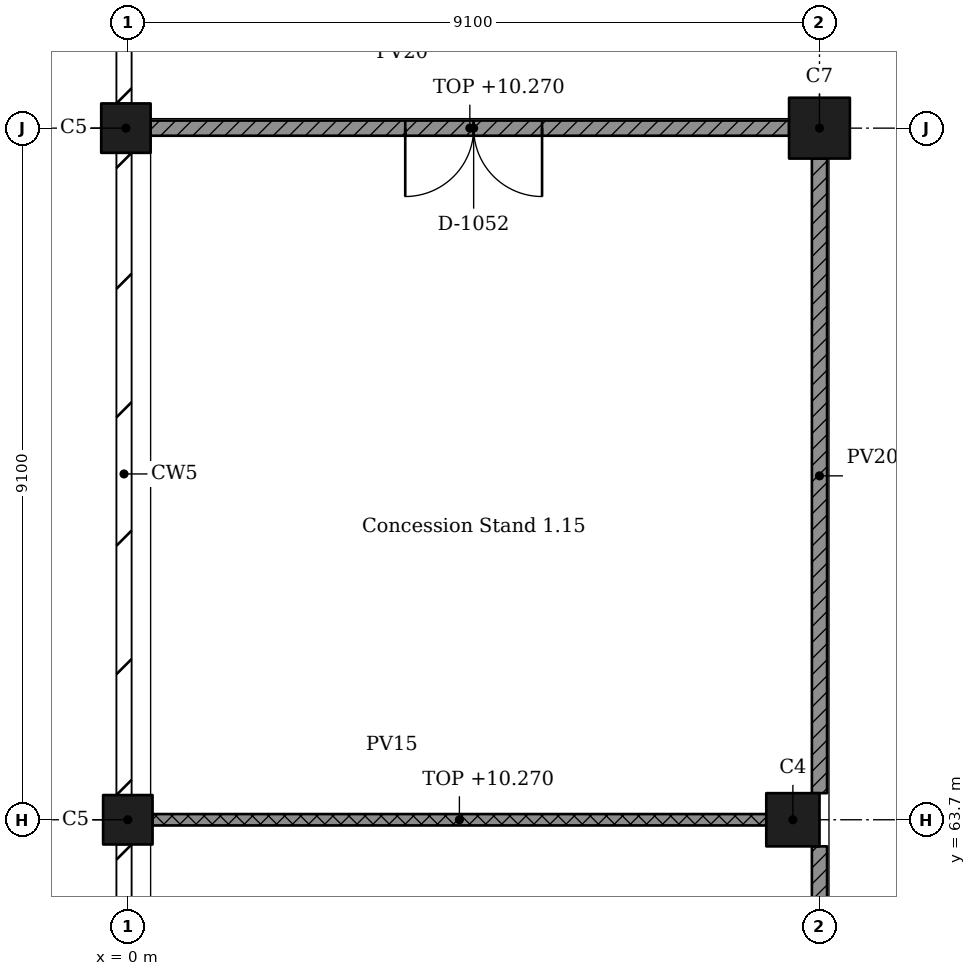
"""IFC4 building model, lengths in metres.
Left out: names, types, materials, properties, quantities, classifications, styles, units other than length and angle.
Written with IfcOpenShell. Run it as: python <this file> out.ifc"""

import sys

from ifc_helpers import new_model, si_unit, direction, frame, frame_2d, origin, origin_2d, place, context, subcontext, project, spatial, rectangle, extrude, element, fill, save


model = new_model("IFC4")
c1 = context("Model", 3, precision=1e-05, world=origin(), true_north=direction((0.0, 1.0)))
c2 = subcontext(c1, "Body", "Model", "MODEL_VIEW")
j1 = project(units=[si_unit("LENGTHUNIT", "METRE"), si_unit("PLANEANGLEUNIT", "RADIAN")], contexts=[c1])
p1 = place(None, origin())
s1 = spatial("IfcSite", under=j1, at=p1, CompositionType="ELEMENT")
p2 = place(p1, origin())
s2 = spatial("IfcBuilding", under=s1, at=p2, CompositionType="ELEMENT")
p3 = place(p2, frame((0.0, 0.0, 6.37)))
s3 = spatial("IfcBuildingStorey", under=s2, at=p3, CompositionType="ELEMENT", Elevation=6.37)
for number, where, z_axis, x_axis in (
    (1, (0.0, 63.7, 0.0), (0.0, 0.0, 1.0), (1.0, 0.0, 0.0)),
    (2, (-0.025, 72.8, 0.0), (0.0, 0.0, 1.0), (1.0, 0.0, 0.0)),
):
    element("IfcColumn", number, at=place(p3, frame(where, z_axis=z_axis, x_axis=x_axis)), inside=s3, PredefinedType="COLUMN", context=c2, shape_type="SweptSolid", body=[
        extrude(rectangle(XDim=0.65, YDim=0.65, at=origin_2d()), origin(), (0.0, 0.0, 1.0), 4.55),
    ])
p4 = place(p3, frame((8.75, 63.7, 0.0), z_axis=(0.0, 0.0, 1.0), x_axis=(1.0, 0.0, 0.0)))
e3 = element("IfcColumn", 3, at=p4, inside=s3, PredefinedType="COLUMN", context=c2, shape_type="SweptSolid", body=[
    extrude(rectangle(XDim=0.7, YDim=0.7, at=origin_2d()), origin(), (0.0, 0.0, 1.0), 4.55),
])
p5 = place(p3, frame((9.1, 72.8, 0.0), z_axis=(0.0, 0.0, 1.0), x_axis=(1.0, 0.0, 0.0)))
e4 = element("IfcColumn", 4, at=p5, inside=s3, PredefinedType="COLUMN", context=c2, shape_type="SweptSolid", body=[
    extrude(rectangle(XDim=0.8, YDim=0.8, at=origin_2d()), origin(), (0.0, 0.0, 1.0), 4.55),
])
p6 = place(p3, frame((0.325, 63.7, 0.0), z_axis=(0.0, 0.0, 1.0), x_axis=(1.0, 0.0, 0.0)))
e5 = element("IfcWall", 5, at=p6, inside=s3, PredefinedType="PARTITIONING", context=c2, shape_type="SweptSolid", body=[
    extrude(rectangle(XDim=8.075, YDim=0.15, at=frame_2d((4.038, 0.0))), origin(), (0.0, 0.0, 1.0), 3.9),
])
p7 = place(p3, frame((8.7, 72.8, 0.0), z_axis=(0.0, 0.0, 1.0), x_axis=(-1.0, 0.0, 0.0)))
e6 = element("IfcWall", 6, at=p7, inside=s3, PredefinedType="PARTITIONING", context=c2, shape_type="SweptSolid", body=[
    extrude(rectangle(XDim=8.4, YDim=0.2, at=frame_2d((4.2, 0.0))), origin(), (0.0, 0.0, 1.0), 3.9),
])
p8 = place(p7, frame((3.25, 0.0, 0.0)))
e7 = element("IfcOpeningElement", 7, at=p8, cuts=e6, PredefinedType="OPENING", context=c2, shape_type="SweptSolid", body=[
    extrude(rectangle(XDim=1.8, YDim=2.1, at=frame_2d((0.9, 1.05))), frame((0.0, 0.11, 0.0), z_axis=(0.0, -1.0, 0.0), x_axis=(1.0, 0.0, 0.0)), (0.0, 0.0, 1.0), 0.22),
])
p9 = place(p3, frame((9.1, 54.95, 0.0), z_axis=(0.0, 0.0, 1.0), x_axis=(0.0, 1.0, 0.0)))
e8 = element("IfcWall", 8, at=p9, inside=s3, PredefinedType="PARTITIONING", context=c2, shape_type="SweptSolid", body=[
    extrude(rectangle(XDim=8.4, YDim=0.2, at=frame_2d((4.2, 0.0))), origin(), (0.0, 0.0, 1.0), 3.9),
])
p10 = place(p9, frame((3.55, 0.0, 0.0)))
e9 = element("IfcOpeningElement", 9, at=p10, cuts=e8, PredefinedType="OPENING", context=c2, shape_type="SweptSolid", body=[
    extrude(rectangle(XDim=1.2, YDim=2.1, at=frame_2d((0.6, 1.05))), frame((0.0, 0.11, 0.0), z_axis=(0.0, -1.0, 0.0), x_axis=(1.0, 0.0, 0.0)), (0.0, 0.0, 1.0), 0.22),
])
p11 = place(p3, frame((9.1, 64.05, 0.0), z_axis=(0.0, 0.0, 1.0), x_axis=(0.0, 1.0, 0.0)))
e10 = element("IfcWall", 10, at=p11, inside=s3, PredefinedType="PARTITIONING", context=c2, shape_type="SweptSolid", body=[
    extrude(rectangle(XDim=8.35, YDim=0.2, at=frame_2d((4.175, 0.0))), origin(), (0.0, 0.0, 1.0), 3.9),
])
p12 = place(p8, origin())
e11 = element("IfcDoor", 11, at=p12, inside=s3, OperationType="DOUBLE_DOOR_SINGLE_SWING", PredefinedType="DOOR", context=c2, shape_type="SweptSolid", body=[
    extrude(rectangle(XDim=1.8, YDim=2.1, at=frame_2d((0.9, 1.05))), frame((0.0, 0.025, 0.0), z_axis=(0.0, -1.0, 0.0), x_axis=(1.0, 0.0, 0.0)), (0.0, 0.0, 1.0), 0.05),
])
fill(e7, e11)
save(model, sys.argv[1])
